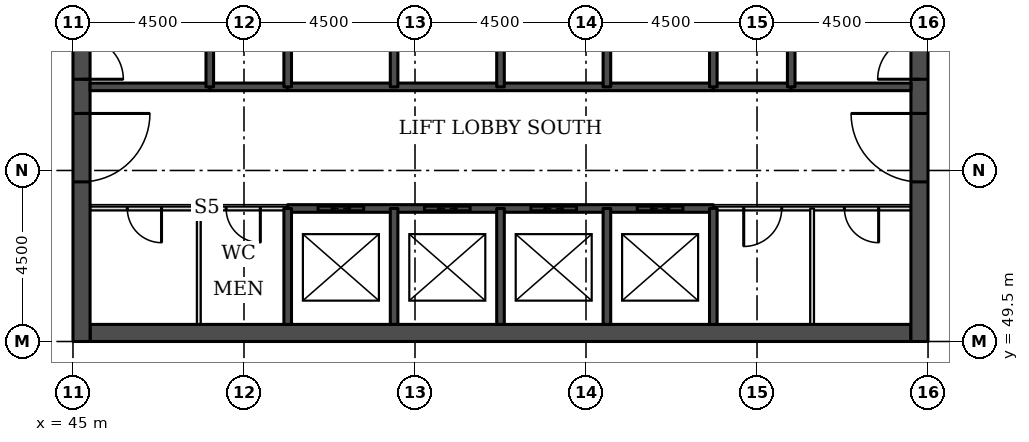
"""IFC4 building model, lengths in metres.
Left out: names, types, materials, properties, quantities, classifications, styles, units other than length and angle.
Written with IfcOpenShell. Run it as: python <this file> out.ifc"""

import sys

from ifc_helpers import new_model, si_unit, direction, frame, frame_2d, origin, place, context, subcontext, project, spatial, rectangle, extrude, element, fill, save


model = new_model("IFC4")
c1 = context("Model", 3, precision=1e-05, world=origin(), true_north=direction((0.0, 1.0)))
c2 = subcontext(c1, "Body", "Model", "MODEL_VIEW")
j1 = project(units=[si_unit("LENGTHUNIT", "METRE"), si_unit("PLANEANGLEUNIT", "RADIAN")], contexts=[c1])
p1 = place(None, origin())
s1 = spatial("IfcSite", under=j1, at=p1, CompositionType="ELEMENT")
p2 = place(p1, origin())
s2 = spatial("IfcBuilding", under=s1, at=p2, CompositionType="ELEMENT")
p3 = place(p2, frame((0.0, 0.0, 115.9)))
s3 = spatial("IfcBuildingStorey", under=s2, at=p3, CompositionType="ELEMENT", Elevation=115.9)
p4 = place(p3, frame((45.45, 49.725, 0.0), z_axis=(0.0, 0.0, 1.0), x_axis=(1.0, 0.0, 0.0)))
e1 = element("IfcWall", 1, at=p4, inside=s3, PredefinedType="SHEAR", context=c2, shape_type="SweptSolid", body=[
    extrude(rectangle(XDim=21.6, YDim=0.45, at=frame_2d((10.8, 0.0))), origin(), (0.0, 0.0, 1.0), 3.7),
])
p5 = place(p3, frame((45.225, 49.5, 0.0), z_axis=(0.0, 0.0, 1.0), x_axis=(0.0, 1.0, 0.0)))
e2 = element("IfcWall", 2, at=p5, inside=s3, PredefinedType="SHEAR", context=c2, shape_type="SweptSolid", body=[
    extrude(rectangle(XDim=22.5, YDim=0.45, at=frame_2d((11.25, 0.0))), origin(), (0.0, 0.0, 1.0), 3.7),
])
p6 = place(p5, frame((4.2, 0.0, 0.0)))
e3 = element("IfcOpeningElement", 3, at=p6, cuts=e2, PredefinedType="OPENING", context=c2, shape_type="SweptSolid", body=[
    extrude(rectangle(XDim=1.8, YDim=2.1, at=frame_2d((0.9, 1.05))), frame((0.0, 0.235, 0.0), z_axis=(0.0, -1.0, 0.0), x_axis=(1.0, 0.0, 0.0)), (0.0, 0.0, 1.0), 0.47),
])
p7 = place(p5, frame((6.9, 0.0, 0.0)))
e4 = element("IfcOpeningElement", 4, at=p7, cuts=e2, PredefinedType="OPENING", context=c2, shape_type="SweptSolid", body=[
    extrude(rectangle(XDim=1.1, YDim=2.1, at=frame_2d((0.55, 1.05))), frame((0.0, 0.235, 0.0), z_axis=(0.0, -1.0, 0.0), x_axis=(1.0, 0.0, 0.0)), (0.0, 0.0, 1.0), 0.47),
])
p8 = place(p5, frame((13.6, 0.0, 0.0)))
e5 = element("IfcOpeningElement", 5, at=p8, cuts=e2, PredefinedType="OPENING", context=c2, shape_type="SweptSolid", body=[
    extrude(rectangle(XDim=1.1, YDim=2.1, at=frame_2d((0.55, 1.05))), frame((0.0, 0.235, 0.0), z_axis=(0.0, -1.0, 0.0), x_axis=(1.0, 0.0, 0.0)), (0.0, 0.0, 1.0), 0.47),
])
p9 = place(p5, frame((16.5, 0.0, 0.0)))
e6 = element("IfcOpeningElement", 6, at=p9, cuts=e2, PredefinedType="OPENING", context=c2, shape_type="SweptSolid", body=[
    extrude(rectangle(XDim=1.8, YDim=2.1, at=frame_2d((0.9, 1.05))), frame((0.0, 0.235, 0.0), z_axis=(0.0, -1.0, 0.0), x_axis=(1.0, 0.0, 0.0)), (0.0, 0.0, 1.0), 0.47),
])
p10 = place(p3, frame((67.275, 49.5, 0.0), z_axis=(0.0, 0.0, 1.0), x_axis=(0.0, 1.0, 0.0)))
e7 = element("IfcWall", 7, at=p10, inside=s3, PredefinedType="SHEAR", context=c2, shape_type="SweptSolid", body=[
    extrude(rectangle(XDim=22.5, YDim=0.45, at=frame_2d((11.25, 0.0))), origin(), (0.0, 0.0, 1.0), 3.7),
])
p11 = place(p10, frame((4.2, 0.0, 0.0)))
e8 = element("IfcOpeningElement", 8, at=p11, cuts=e7, PredefinedType="OPENING", context=c2, shape_type="SweptSolid", body=[
    extrude(rectangle(XDim=1.8, YDim=2.1, at=frame_2d((0.9, 1.05))), frame((0.0, 0.235, 0.0), z_axis=(0.0, -1.0, 0.0), x_axis=(1.0, 0.0, 0.0)), (0.0, 0.0, 1.0), 0.47),
])
p12 = place(p10, frame((6.9, 0.0, 0.0)))
e9 = element("IfcOpeningElement", 9, at=p12, cuts=e7, PredefinedType="OPENING", context=c2, shape_type="SweptSolid", body=[
    extrude(rectangle(XDim=1.1, YDim=2.1, at=frame_2d((0.55, 1.05))), frame((0.0, 0.235, 0.0), z_axis=(0.0, -1.0, 0.0), x_axis=(1.0, 0.0, 0.0)), (0.0, 0.0, 1.0), 0.47),
])
p13 = place(p10, frame((13.6, 0.0, 0.0)))
e10 = element("IfcOpeningElement", 10, at=p13, cuts=e7, PredefinedType="OPENING", context=c2, shape_type="SweptSolid", body=[
    extrude(rectangle(XDim=1.1, YDim=2.1, at=frame_2d((0.55, 1.05))), frame((0.0, 0.235, 0.0), z_axis=(0.0, -1.0, 0.0), x_axis=(1.0, 0.0, 0.0)), (0.0, 0.0, 1.0), 0.47),
])
p14 = place(p10, frame((16.5, 0.0, 0.0)))
e11 = element("IfcOpeningElement", 11, at=p14, cuts=e7, PredefinedType="OPENING", context=c2, shape_type="SweptSolid", body=[
    extrude(rectangle(XDim=1.8, YDim=2.1, at=frame_2d((0.9, 1.05))), frame((0.0, 0.235, 0.0), z_axis=(0.0, -1.0, 0.0), x_axis=(1.0, 0.0, 0.0)), (0.0, 0.0, 1.0), 0.47),
])
p15 = place(p3, frame((45.45, 53.0, 0.0), z_axis=(0.0, 0.0, 1.0), x_axis=(1.0, 0.0, 0.0)))
e12 = element("IfcWall", 12, at=p15, inside=s3, PredefinedType="PARTITIONING", context=c2, shape_type="SweptSolid", body=[
    extrude(rectangle(XDim=5.2, YDim=0.1, at=frame_2d((2.6, 0.0))), origin(), (0.0, 0.0, 1.0), 3.55),
])
p16 = place(p15, frame((0.98, 0.0, 0.0)))
e13 = element("IfcOpeningElement", 13, at=p16, cuts=e12, PredefinedType="OPENING", context=c2, shape_type="SweptSolid", body=[
    extrude(rectangle(XDim=0.9, YDim=2.1, at=frame_2d((0.45, 1.05))), frame((0.0, 0.06, 0.0), z_axis=(0.0, -1.0, 0.0), x_axis=(1.0, 0.0, 0.0)), (0.0, 0.0, 1.0), 0.12),
])
p17 = place(p15, frame((3.58, 0.0, 0.0)))
e14 = element("IfcOpeningElement", 14, at=p17, cuts=e12, PredefinedType="OPENING", context=c2, shape_type="SweptSolid", body=[
    extrude(rectangle(XDim=0.9, YDim=2.1, at=frame_2d((0.45, 1.05))), frame((0.0, 0.06, 0.0), z_axis=(0.0, -1.0, 0.0), x_axis=(1.0, 0.0, 0.0)), (0.0, 0.0, 1.0), 0.12),
])
p18 = place(p3, frame((61.85, 53.0, 0.0), z_axis=(0.0, 0.0, 1.0), x_axis=(1.0, 0.0, 0.0)))
e15 = element("IfcWall", 15, at=p18, inside=s3, PredefinedType="PARTITIONING", context=c2, shape_type="SweptSolid", body=[
    extrude(rectangle(XDim=5.2, YDim=0.1, at=frame_2d((2.6, 0.0))), origin(), (0.0, 0.0, 1.0), 3.55),
])
p19 = place(p18, frame((3.45, 0.0, 0.0)))
e16 = element("IfcOpeningElement", 16, at=p19, cuts=e15, PredefinedType="OPENING", context=c2, shape_type="SweptSolid", body=[
    extrude(rectangle(XDim=0.9, YDim=2.1, at=frame_2d((0.45, 1.05))), frame((0.0, 0.06, 0.0), z_axis=(0.0, -1.0, 0.0), x_axis=(1.0, 0.0, 0.0)), (0.0, 0.0, 1.0), 0.12),
])
p20 = place(p18, frame((0.8, 0.0, 0.0)))
e17 = element("IfcOpeningElement", 17, at=p20, cuts=e15, PredefinedType="OPENING", context=c2, shape_type="SweptSolid", body=[
    extrude(rectangle(XDim=1.0, YDim=2.1, at=frame_2d((0.5, 1.05))), frame((0.0, 0.06, 0.0), z_axis=(0.0, -1.0, 0.0), x_axis=(1.0, 0.0, 0.0)), (0.0, 0.0, 1.0), 0.12),
])
p21 = place(p3, frame((50.65, 53.0, 0.0), z_axis=(0.0, 0.0, 1.0), x_axis=(1.0, 0.0, 0.0)))
e18 = element("IfcWall", 18, at=p21, inside=s3, PredefinedType="SOLIDWALL", context=c2, shape_type="SweptSolid", body=[
    extrude(rectangle(XDim=11.2, YDim=0.2, at=frame_2d((5.6, 0.0))), origin(), (0.0, 0.0, 1.0), 3.55),
])
p22 = place(p21, frame((0.8, 0.0, 0.0)))
e19 = element("IfcOpeningElement", 19, at=p22, cuts=e18, PredefinedType="OPENING", context=c2, shape_type="SweptSolid", body=[
    extrude(rectangle(XDim=1.2, YDim=2.1, at=frame_2d((0.6, 1.05))), frame((0.0, 0.11, 0.0), z_axis=(0.0, -1.0, 0.0), x_axis=(1.0, 0.0, 0.0)), (0.0, 0.0, 1.0), 0.22),
])
p23 = place(p21, frame((3.6, 0.0, 0.0)))
e20 = element("IfcOpeningElement", 20, at=p23, cuts=e18, PredefinedType="OPENING", context=c2, shape_type="SweptSolid", body=[
    extrude(rectangle(XDim=1.2, YDim=2.1, at=frame_2d((0.6, 1.05))), frame((0.0, 0.11, 0.0), z_axis=(0.0, -1.0, 0.0), x_axis=(1.0, 0.0, 0.0)), (0.0, 0.0, 1.0), 0.22),
])
p24 = place(p21, frame((6.4, 0.0, 0.0)))
e21 = element("IfcOpeningElement", 21, at=p24, cuts=e18, PredefinedType="OPENING", context=c2, shape_type="SweptSolid", body=[
    extrude(rectangle(XDim=1.2, YDim=2.1, at=frame_2d((0.6, 1.05))), frame((0.0, 0.11, 0.0), z_axis=(0.0, -1.0, 0.0), x_axis=(1.0, 0.0, 0.0)), (0.0, 0.0, 1.0), 0.22),
])
p25 = place(p21, frame((9.2, 0.0, 0.0)))
e22 = element("IfcOpeningElement", 22, at=p25, cuts=e18, PredefinedType="OPENING", context=c2, shape_type="SweptSolid", body=[
    extrude(rectangle(XDim=1.2, YDim=2.1, at=frame_2d((0.6, 1.05))), frame((0.0, 0.11, 0.0), z_axis=(0.0, -1.0, 0.0), x_axis=(1.0, 0.0, 0.0)), (0.0, 0.0, 1.0), 0.22),
])
for number, where, z_axis, x_axis in (
    (23, (48.6, 56.2, 0.0), (0.0, 0.0, 1.0), (1.0, 0.0, 0.0)),
    (24, (61.85, 56.2, 0.0), (0.0, 0.0, 1.0), (1.0, 0.0, 0.0)),
):
    element("IfcWall", number, at=place(p3, frame(where, z_axis=z_axis, x_axis=x_axis)), inside=s3, PredefinedType="SOLIDWALL", context=c2, shape_type="SweptSolid", body=[
        extrude(rectangle(XDim=2.05, YDim=0.2, at=frame_2d((1.025, 0.0))), origin(), (0.0, 0.0, 1.0), 3.55),
    ])
p26 = place(p3, frame((45.45, 56.2, 0.0), z_axis=(0.0, 0.0, 1.0), x_axis=(1.0, 0.0, 0.0)))
e25 = element("IfcWall", 25, at=p26, inside=s3, PredefinedType="SOLIDWALL", context=c2, shape_type="SweptSolid", body=[
    extrude(rectangle(XDim=3.15, YDim=0.2, at=frame_2d((1.575, 0.0))), origin(), (0.0, 0.0, 1.0), 3.55),
])
p27 = place(p3, frame((50.65, 56.2, 0.0), z_axis=(0.0, 0.0, 1.0), x_axis=(1.0, 0.0, 0.0)))
e26 = element("IfcWall", 26, at=p27, inside=s3, PredefinedType="SOLIDWALL", context=c2, shape_type="SweptSolid", body=[
    extrude(rectangle(XDim=11.2, YDim=0.2, at=frame_2d((5.6, 0.0))), origin(), (0.0, 0.0, 1.0), 3.55),
])
p28 = place(p3, frame((63.9, 56.2, 0.0), z_axis=(0.0, 0.0, 1.0), x_axis=(1.0, 0.0, 0.0)))
e27 = element("IfcWall", 27, at=p28, inside=s3, PredefinedType="SOLIDWALL", context=c2, shape_type="SweptSolid", body=[
    extrude(rectangle(XDim=3.15, YDim=0.2, at=frame_2d((1.575, 0.0))), origin(), (0.0, 0.0, 1.0), 3.55),
])
p29 = place(p3, frame((48.31, 49.95, 0.0), z_axis=(0.0, 0.0, 1.0), x_axis=(0.0, 1.0, 0.0)))
e28 = element("IfcWall", 28, at=p29, inside=s3, PredefinedType="PARTITIONING", context=c2, shape_type="SweptSolid", body=[
    extrude(rectangle(XDim=3.05, YDim=0.1, at=frame_2d((1.525, 0.0))), origin(), (0.0, 0.0, 1.0), 3.55),
])
p30 = place(p3, frame((48.6, 56.2, 0.0), z_axis=(0.0, 0.0, 1.0), x_axis=(0.0, 1.0, 0.0)))
e29 = element("IfcWall", 29, at=p30, inside=s3, PredefinedType="SOLIDWALL", context=c2, shape_type="SweptSolid", body=[
    extrude(rectangle(XDim=5.8, YDim=0.2, at=frame_2d((2.9, 0.0))), origin(), (0.0, 0.0, 1.0), 3.55),
])
p31 = place(p3, frame((50.65, 49.95, 0.0), z_axis=(0.0, 0.0, 1.0), x_axis=(0.0, 1.0, 0.0)))
e30 = element("IfcWall", 30, at=p31, inside=s3, PredefinedType="SOLIDWALL", context=c2, shape_type="SweptSolid", body=[
    extrude(rectangle(XDim=3.05, YDim=0.2, at=frame_2d((1.525, 0.0))), origin(), (0.0, 0.0, 1.0), 3.55),
])
p32 = place(p3, frame((50.65, 56.2, 0.0), z_axis=(0.0, 0.0, 1.0), x_axis=(0.0, 1.0, 0.0)))
e31 = element("IfcWall", 31, at=p32, inside=s3, PredefinedType="SOLIDWALL", context=c2, shape_type="SweptSolid", body=[
    extrude(rectangle(XDim=2.8, YDim=0.2, at=frame_2d((1.4, 0.0))), origin(), (0.0, 0.0, 1.0), 3.55),
])
p33 = place(p3, frame((53.45, 49.95, 0.0), z_axis=(0.0, 0.0, 1.0), x_axis=(0.0, 1.0, 0.0)))
e32 = element("IfcWall", 32, at=p33, inside=s3, PredefinedType="SOLIDWALL", context=c2, shape_type="SweptSolid", body=[
    extrude(rectangle(XDim=3.05, YDim=0.2, at=frame_2d((1.525, 0.0))), origin(), (0.0, 0.0, 1.0), 3.55),
])
p34 = place(p3, frame((53.45, 56.2, 0.0), z_axis=(0.0, 0.0, 1.0), x_axis=(0.0, 1.0, 0.0)))
e33 = element("IfcWall", 33, at=p34, inside=s3, PredefinedType="SOLIDWALL", context=c2, shape_type="SweptSolid", body=[
    extrude(rectangle(XDim=2.8, YDim=0.2, at=frame_2d((1.4, 0.0))), origin(), (0.0, 0.0, 1.0), 3.55),
])
p35 = place(p3, frame((56.25, 49.95, 0.0), z_axis=(0.0, 0.0, 1.0), x_axis=(0.0, 1.0, 0.0)))
e34 = element("IfcWall", 34, at=p35, inside=s3, PredefinedType="SOLIDWALL", context=c2, shape_type="SweptSolid", body=[
    extrude(rectangle(XDim=3.05, YDim=0.2, at=frame_2d((1.525, 0.0))), origin(), (0.0, 0.0, 1.0), 3.55),
])
p36 = place(p3, frame((56.25, 56.2, 0.0), z_axis=(0.0, 0.0, 1.0), x_axis=(0.0, 1.0, 0.0)))
e35 = element("IfcWall", 35, at=p36, inside=s3, PredefinedType="SOLIDWALL", context=c2, shape_type="SweptSolid", body=[
    extrude(rectangle(XDim=2.8, YDim=0.2, at=frame_2d((1.4, 0.0))), origin(), (0.0, 0.0, 1.0), 3.55),
])
p37 = place(p3, frame((59.05, 49.95, 0.0), z_axis=(0.0, 0.0, 1.0), x_axis=(0.0, 1.0, 0.0)))
e36 = element("IfcWall", 36, at=p37, inside=s3, PredefinedType="SOLIDWALL", context=c2, shape_type="SweptSolid", body=[
    extrude(rectangle(XDim=3.05, YDim=0.2, at=frame_2d((1.525, 0.0))), origin(), (0.0, 0.0, 1.0), 3.55),
])
p38 = place(p3, frame((59.05, 56.2, 0.0), z_axis=(0.0, 0.0, 1.0), x_axis=(0.0, 1.0, 0.0)))
e37 = element("IfcWall", 37, at=p38, inside=s3, PredefinedType="SOLIDWALL", context=c2, shape_type="SweptSolid", body=[
    extrude(rectangle(XDim=2.8, YDim=0.2, at=frame_2d((1.4, 0.0))), origin(), (0.0, 0.0, 1.0), 3.55),
])
p39 = place(p3, frame((61.85, 49.95, 0.0), z_axis=(0.0, 0.0, 1.0), x_axis=(0.0, 1.0, 0.0)))
e38 = element("IfcWall", 38, at=p39, inside=s3, PredefinedType="SOLIDWALL", context=c2, shape_type="SweptSolid", body=[
    extrude(rectangle(XDim=3.05, YDim=0.2, at=frame_2d((1.525, 0.0))), origin(), (0.0, 0.0, 1.0), 3.55),
])
p40 = place(p3, frame((61.85, 56.2, 0.0), z_axis=(0.0, 0.0, 1.0), x_axis=(0.0, 1.0, 0.0)))
e39 = element("IfcWall", 39, at=p40, inside=s3, PredefinedType="SOLIDWALL", context=c2, shape_type="SweptSolid", body=[
    extrude(rectangle(XDim=2.8, YDim=0.2, at=frame_2d((1.4, 0.0))), origin(), (0.0, 0.0, 1.0), 3.55),
])
p41 = place(p3, frame((63.9, 56.2, 0.0), z_axis=(0.0, 0.0, 1.0), x_axis=(0.0, 1.0, 0.0)))
e40 = element("IfcWall", 40, at=p41, inside=s3, PredefinedType="SOLIDWALL", context=c2, shape_type="SweptSolid", body=[
    extrude(rectangle(XDim=5.8, YDim=0.2, at=frame_2d((2.9, 0.0))), origin(), (0.0, 0.0, 1.0), 3.55),
])
p42 = place(p3, frame((64.45, 49.95, 0.0), z_axis=(0.0, 0.0, 1.0), x_axis=(0.0, 1.0, 0.0)))
e41 = element("IfcWall", 41, at=p42, inside=s3, PredefinedType="PARTITIONING", context=c2, shape_type="SweptSolid", body=[
    extrude(rectangle(XDim=3.05, YDim=0.1, at=frame_2d((1.525, 0.0))), origin(), (0.0, 0.0, 1.0), 3.55),
])
p43 = place(p22, origin())
e42 = element("IfcDoor", 42, at=p43, inside=s3, OperationType="DOUBLE_DOOR_SLIDING", PredefinedType="DOOR", context=c2, shape_type="SweptSolid", body=[
    extrude(rectangle(XDim=1.2, YDim=2.1, at=frame_2d((0.6, 1.05))), frame((0.0, 0.025, 0.0), z_axis=(0.0, -1.0, 0.0), x_axis=(1.0, 0.0, 0.0)), (0.0, 0.0, 1.0), 0.05),
])
fill(e19, e42)
p44 = place(p23, origin())
e43 = element("IfcDoor", 43, at=p44, inside=s3, OperationType="DOUBLE_DOOR_SLIDING", PredefinedType="DOOR", context=c2, shape_type="SweptSolid", body=[
    extrude(rectangle(XDim=1.2, YDim=2.1, at=frame_2d((0.6, 1.05))), frame((0.0, 0.025, 0.0), z_axis=(0.0, -1.0, 0.0), x_axis=(1.0, 0.0, 0.0)), (0.0, 0.0, 1.0), 0.05),
])
fill(e20, e43)
p45 = place(p24, origin())
e44 = element("IfcDoor", 44, at=p45, inside=s3, OperationType="DOUBLE_DOOR_SLIDING", PredefinedType="DOOR", context=c2, shape_type="SweptSolid", body=[
    extrude(rectangle(XDim=1.2, YDim=2.1, at=frame_2d((0.6, 1.05))), frame((0.0, 0.025, 0.0), z_axis=(0.0, -1.0, 0.0), x_axis=(1.0, 0.0, 0.0)), (0.0, 0.0, 1.0), 0.05),
])
fill(e21, e44)
p46 = place(p25, origin())
e45 = element("IfcDoor", 45, at=p46, inside=s3, OperationType="DOUBLE_DOOR_SLIDING", PredefinedType="DOOR", context=c2, shape_type="SweptSolid", body=[
    extrude(rectangle(XDim=1.2, YDim=2.1, at=frame_2d((0.6, 1.05))), frame((0.0, 0.025, 0.0), z_axis=(0.0, -1.0, 0.0), x_axis=(1.0, 0.0, 0.0)), (0.0, 0.0, 1.0), 0.05),
])
fill(e22, e45)
p47 = place(p6, frame((1.8, 0.0, 0.0), z_axis=(0.0, 0.0, 1.0), x_axis=(-1.0, 0.0, 0.0)))
e46 = element("IfcDoor", 46, at=p47, inside=s3, OperationType="SINGLE_SWING_LEFT", PredefinedType="DOOR", context=c2, shape_type="SweptSolid", body=[
    extrude(rectangle(XDim=1.8, YDim=2.1, at=frame_2d((0.9, 1.05))), frame((0.0, 0.025, 0.0), z_axis=(0.0, -1.0, 0.0), x_axis=(1.0, 0.0, 0.0)), (0.0, 0.0, 1.0), 0.05),
])
fill(e3, e46)
p48 = place(p7, frame((1.1, 0.0, 0.0), z_axis=(0.0, 0.0, 1.0), x_axis=(-1.0, 0.0, 0.0)))
e47 = element("IfcDoor", 47, at=p48, inside=s3, OperationType="SINGLE_SWING_RIGHT", PredefinedType="DOOR", context=c2, shape_type="SweptSolid", body=[
    extrude(rectangle(XDim=1.1, YDim=2.1, at=frame_2d((0.55, 1.05))), frame((0.0, 0.025, 0.0), z_axis=(0.0, -1.0, 0.0), x_axis=(1.0, 0.0, 0.0)), (0.0, 0.0, 1.0), 0.05),
])
fill(e4, e47)
p49 = place(p11, origin())
e48 = element("IfcDoor", 48, at=p49, inside=s3, OperationType="SINGLE_SWING_RIGHT", PredefinedType="DOOR", context=c2, shape_type="SweptSolid", body=[
    extrude(rectangle(XDim=1.8, YDim=2.1, at=frame_2d((0.9, 1.05))), frame((0.0, 0.025, 0.0), z_axis=(0.0, -1.0, 0.0), x_axis=(1.0, 0.0, 0.0)), (0.0, 0.0, 1.0), 0.05),
])
fill(e8, e48)
p50 = place(p12, origin())
e49 = element("IfcDoor", 49, at=p50, inside=s3, OperationType="SINGLE_SWING_LEFT", PredefinedType="DOOR", context=c2, shape_type="SweptSolid", body=[
    extrude(rectangle(XDim=1.1, YDim=2.1, at=frame_2d((0.55, 1.05))), frame((0.0, 0.025, 0.0), z_axis=(0.0, -1.0, 0.0), x_axis=(1.0, 0.0, 0.0)), (0.0, 0.0, 1.0), 0.05),
])
fill(e9, e49)
p51 = place(p19, frame((0.9, 0.0, 0.0), z_axis=(0.0, 0.0, 1.0), x_axis=(-1.0, 0.0, 0.0)))
e50 = element("IfcDoor", 50, at=p51, inside=s3, OperationType="SINGLE_SWING_LEFT", PredefinedType="DOOR", context=c2, shape_type="SweptSolid", body=[
    extrude(rectangle(XDim=0.9, YDim=2.1, at=frame_2d((0.45, 1.05))), frame((0.0, 0.025, 0.0), z_axis=(0.0, -1.0, 0.0), x_axis=(1.0, 0.0, 0.0)), (0.0, 0.0, 1.0), 0.05),
])
fill(e16, e50)
p52 = place(p20, frame((1.0, 0.0, 0.0), z_axis=(0.0, 0.0, 1.0), x_axis=(-1.0, 0.0, 0.0)))
e51 = element("IfcDoor", 51, at=p52, inside=s3, OperationType="SINGLE_SWING_RIGHT", PredefinedType="DOOR", context=c2, shape_type="SweptSolid", body=[
    extrude(rectangle(XDim=1.0, YDim=2.1, at=frame_2d((0.5, 1.05))), frame((0.0, 0.025, 0.0), z_axis=(0.0, -1.0, 0.0), x_axis=(1.0, 0.0, 0.0)), (0.0, 0.0, 1.0), 0.05),
])
fill(e17, e51)
p53 = place(p16, frame((0.9, 0.0, 0.0), z_axis=(0.0, 0.0, 1.0), x_axis=(-1.0, 0.0, 0.0)))
e52 = element("IfcDoor", 52, at=p53, inside=s3, OperationType="SINGLE_SWING_LEFT", PredefinedType="DOOR", context=c2, shape_type="SweptSolid", body=[
    extrude(rectangle(XDim=0.9, YDim=2.1, at=frame_2d((0.45, 1.05))), frame((0.0, 0.025, 0.0), z_axis=(0.0, -1.0, 0.0), x_axis=(1.0, 0.0, 0.0)), (0.0, 0.0, 1.0), 0.05),
])
fill(e13, e52)
p54 = place(p17, frame((0.9, 0.0, 0.0), z_axis=(0.0, 0.0, 1.0), x_axis=(-1.0, 0.0, 0.0)))
e53 = element("IfcDoor", 53, at=p54, inside=s3, OperationType="SINGLE_SWING_LEFT", PredefinedType="DOOR", context=c2, shape_type="SweptSolid", body=[
    extrude(rectangle(XDim=0.9, YDim=2.1, at=frame_2d((0.45, 1.05))), frame((0.0, 0.025, 0.0), z_axis=(0.0, -1.0, 0.0), x_axis=(1.0, 0.0, 0.0)), (0.0, 0.0, 1.0), 0.05),
])
fill(e14, e53)
save(model, sys.argv[1])
